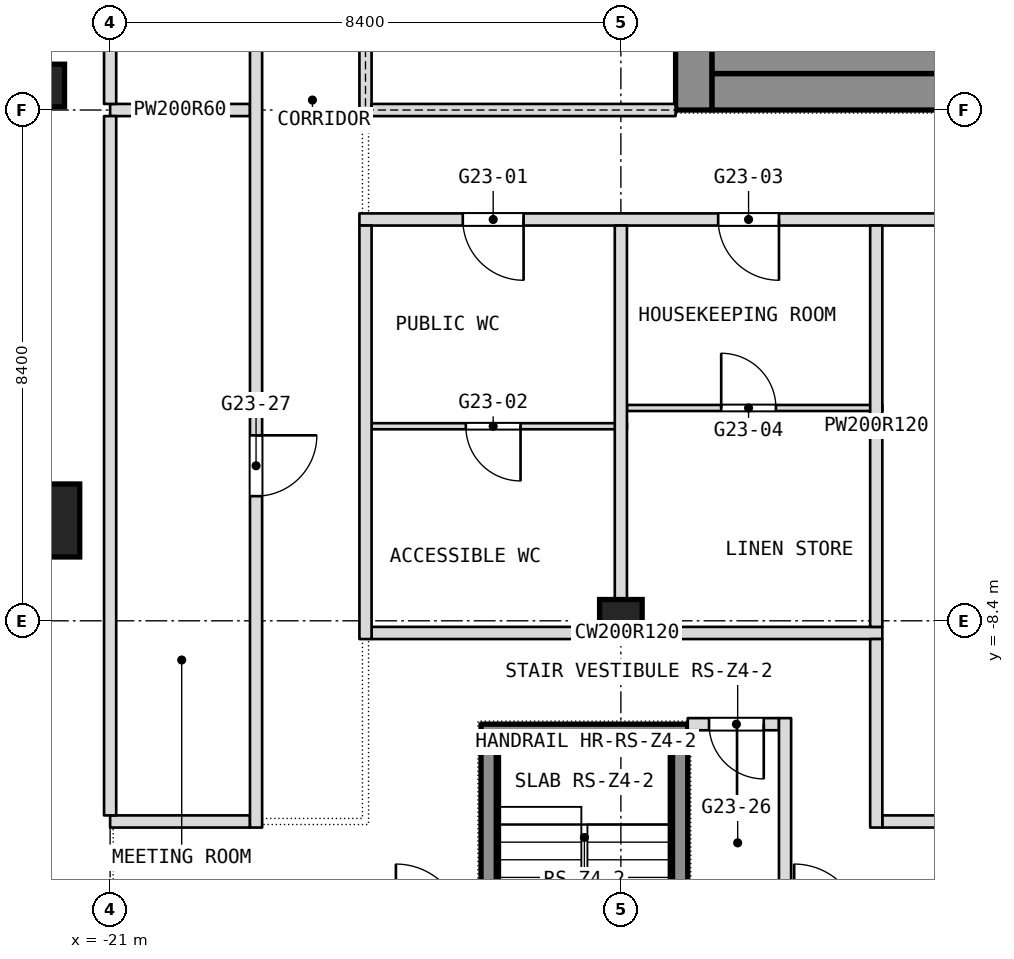
"""IFC4 building model, lengths in metres.
Left out: names, types, materials, properties, quantities, classifications, styles, units other than length and angle.
Written with IfcOpenShell. Run it as: python <this file> out.ifc"""

import sys

from ifc_helpers import new_model, si_unit, direction, frame, frame_2d, origin, origin_2d, place, context, subcontext, project, spatial, rectangle, extrude, element, fill, save


model = new_model("IFC4")
c1 = context("Model", 3, precision=1e-05, world=origin(), true_north=direction((0.0, 1.0)))
c2 = subcontext(c1, "Body", "Model", "MODEL_VIEW")
j1 = project(units=[si_unit("LENGTHUNIT", "METRE"), si_unit("PLANEANGLEUNIT", "RADIAN")], contexts=[c1])
p1 = place(None, origin())
s1 = spatial("IfcSite", under=j1, at=p1, CompositionType="ELEMENT")
p2 = place(p1, origin())
s2 = spatial("IfcBuilding", under=s1, at=p2, CompositionType="ELEMENT")
p3 = place(p2, frame((0.0, 0.0, 270.5)))
s3 = spatial("IfcBuildingStorey", under=s2, at=p3, CompositionType="ELEMENT", Elevation=270.5)
p4 = place(p3, frame((-11.4, 0.0, 0.0), z_axis=(0.0, 0.0, 1.0), x_axis=(0.0, 1.0, 0.0)))
e1 = element("IfcWall", 1, at=p4, inside=s3, PredefinedType="SHEAR", context=c2, shape_type="SweptSolid", body=[
    extrude(rectangle(XDim=16.8, YDim=0.6, at=frame_2d((8.4, 0.0))), origin(), (0.0, 0.0, 1.0), 3.6),
])
p5 = place(p4, frame((3.6, 0.0, 0.0)))
e2 = element("IfcOpeningElement", 2, at=p5, cuts=e1, PredefinedType="OPENING", context=c2, shape_type="SweptSolid", body=[
    extrude(rectangle(XDim=0.9, YDim=2.1, at=frame_2d((0.45, 1.05))), frame((0.0, 0.3, 0.0), z_axis=(0.0, -1.0, 0.0), x_axis=(1.0, 0.0, 0.0)), (0.0, 0.0, 1.0), 0.6),
])
p6 = place(p4, frame((6.825, 0.0, 0.0)))
e3 = element("IfcOpeningElement", 3, at=p6, cuts=e1, PredefinedType="OPENING", context=c2, shape_type="SweptSolid", body=[
    extrude(rectangle(XDim=1.2, YDim=2.1, at=frame_2d((0.6, 1.05))), frame((0.0, 0.3, 0.0), z_axis=(0.0, -1.0, 0.0), x_axis=(1.0, 0.0, 0.0)), (0.0, 0.0, 1.0), 0.6),
])
p7 = place(p4, frame((14.137, 0.0, 0.0)))
e4 = element("IfcOpeningElement", 4, at=p7, cuts=e1, PredefinedType="OPENING", context=c2, shape_type="SweptSolid", body=[
    extrude(rectangle(XDim=0.9, YDim=2.1, at=frame_2d((0.45, 1.05))), frame((0.0, 0.3, 0.0), z_axis=(0.0, -1.0, 0.0), x_axis=(1.0, 0.0, 0.0)), (0.0, 0.0, 1.0), 0.6),
])
p8 = place(p4, frame((11.512, 0.0, 0.0)))
e5 = element("IfcOpeningElement", 5, at=p8, cuts=e1, PredefinedType="OPENING", context=c2, shape_type="SweptSolid", body=[
    extrude(rectangle(XDim=0.9, YDim=2.1, at=frame_2d((0.45, 1.05))), frame((0.0, 0.3, 0.0), z_axis=(0.0, -1.0, 0.0), x_axis=(1.0, 0.0, 0.0)), (0.0, 0.0, 1.0), 0.6),
])
p9 = place(p4, frame((8.775, 0.0, 0.0)))
e6 = element("IfcOpeningElement", 6, at=p9, cuts=e1, PredefinedType="OPENING", context=c2, shape_type="SweptSolid", body=[
    extrude(rectangle(XDim=1.2, YDim=2.1, at=frame_2d((0.6, 1.05))), frame((0.0, 0.3, 0.0), z_axis=(0.0, -1.0, 0.0), x_axis=(1.0, 0.0, 0.0)), (0.0, 0.0, 1.0), 0.6),
])
p10 = place(p3, frame((-11.1, 0.3, 0.0), z_axis=(0.0, 0.0, 1.0), x_axis=(1.0, 0.0, 0.0)))
e7 = element("IfcWall", 7, at=p10, inside=s3, PredefinedType="SHEAR", context=c2, shape_type="SweptSolid", body=[
    extrude(rectangle(XDim=22.2, YDim=0.6, at=frame_2d((11.1, 0.0))), origin(), (0.0, 0.0, 1.0), 3.6),
])
p11 = place(p3, frame((-22.1, -6.75, 0.0), z_axis=(0.0, 0.0, 1.0), x_axis=(1.0, 0.0, 0.0)))
e8 = element("IfcColumn", 8, at=p11, inside=s3, PredefinedType="COLUMN", context=c2, shape_type="SweptSolid", body=[
    extrude(rectangle(XDim=1.2, YDim=1.2, at=origin_2d()), origin(), (0.0, 0.0, 1.0), 3.6),
])
for number, where, z_axis, x_axis in (
    (9, (-12.6, -8.4, 0.0), (0.0, 0.0, 1.0), (1.0, 0.0, 0.0)),
    (10, (-22.1, 0.403, 0.0), (0.0, 0.0, 1.0), (1.0, 0.0, 0.0)),
):
    element("IfcColumn", number, at=place(p3, frame(where, z_axis=z_axis, x_axis=x_axis)), inside=s3, PredefinedType="COLUMN", context=c2, shape_type="SweptSolid", body=[
        extrude(rectangle(XDim=0.7, YDim=0.7, at=origin_2d()), origin(), (0.0, 0.0, 1.0), 3.6),
    ])
p12 = place(p3, frame((-21.0, -11.7, 0.0), z_axis=(0.0, 0.0, 1.0), x_axis=(1.0, 0.0, 0.0)))
e11 = element("IfcWall", 11, at=p12, inside=s3, PredefinedType="PARTITIONING", context=c2, shape_type="SweptSolid", body=[
    extrude(rectangle(XDim=2.3, YDim=0.2, at=frame_2d((1.15, 0.0))), origin(), (0.0, 0.0, 1.0), 3.34),
])
p13 = place(p3, frame((-8.3, -11.7, 0.0), z_axis=(0.0, 0.0, 1.0), x_axis=(1.0, 0.0, 0.0)))
e12 = element("IfcWall", 12, at=p13, inside=s3, PredefinedType="PARTITIONING", context=c2, shape_type="SweptSolid", body=[
    extrude(rectangle(XDim=25.0, YDim=0.2, at=frame_2d((12.5, 0.0))), origin(), (0.0, 0.0, 1.0), 3.34),
])
p14 = place(p3, frame((-11.5, -10.1, 0.0), z_axis=(0.0, 0.0, 1.0), x_axis=(1.0, 0.0, 0.0)))
e13 = element("IfcWall", 13, at=p14, inside=s3, PredefinedType="PARTITIONING", context=c2, shape_type="SweptSolid", body=[
    extrude(rectangle(XDim=1.5, YDim=0.2, at=frame_2d((0.75, 0.0))), origin(), (0.0, 0.0, 1.0), 3.34),
])
p15 = place(p14, frame((0.35, 0.0, 0.0)))
e14 = element("IfcOpeningElement", 14, at=p15, cuts=e13, PredefinedType="OPENING", context=c2, shape_type="SweptSolid", body=[
    extrude(rectangle(XDim=0.9, YDim=2.1, at=frame_2d((0.45, 1.05))), frame((0.0, 0.1, 0.0), z_axis=(0.0, -1.0, 0.0), x_axis=(1.0, 0.0, 0.0)), (0.0, 0.0, 1.0), 0.2),
])
p16 = place(p3, frame((-16.7, -8.6, 0.0), z_axis=(0.0, 0.0, 1.0), x_axis=(1.0, 0.0, 0.0)))
e15 = element("IfcWall", 15, at=p16, inside=s3, PredefinedType="PARTITIONING", context=c2, shape_type="SweptSolid", body=[
    extrude(rectangle(XDim=8.4, YDim=0.2, at=frame_2d((4.2, 0.0))), origin(), (0.0, 0.0, 1.0), 3.34),
])
p17 = place(p3, frame((-16.7, -5.2, 0.0), z_axis=(0.0, 0.0, 1.0), x_axis=(1.0, 0.0, 0.0)))
e16 = element("IfcWall", 16, at=p17, inside=s3, PredefinedType="PARTITIONING", context=c2, shape_type="SweptSolid", body=[
    extrude(rectangle(XDim=4.2, YDim=0.1, at=frame_2d((2.1, 0.0))), origin(), (0.0, 0.0, 1.0), 3.34),
])
p18 = place(p17, frame((1.55, 0.0, 0.0)))
e17 = element("IfcOpeningElement", 17, at=p18, cuts=e16, PredefinedType="OPENING", context=c2, shape_type="SweptSolid", body=[
    extrude(rectangle(XDim=0.9, YDim=2.1, at=frame_2d((0.45, 1.05))), frame((0.0, 0.05, 0.0), z_axis=(0.0, -1.0, 0.0), x_axis=(1.0, 0.0, 0.0)), (0.0, 0.0, 1.0), 0.1),
])
p19 = place(p3, frame((-12.5, -4.9, 0.0), z_axis=(0.0, 0.0, 1.0), x_axis=(1.0, 0.0, 0.0)))
e18 = element("IfcWall", 18, at=p19, inside=s3, PredefinedType="PARTITIONING", context=c2, shape_type="SweptSolid", body=[
    extrude(rectangle(XDim=4.2, YDim=0.1, at=frame_2d((2.1, 0.0))), origin(), (0.0, 0.0, 1.0), 3.34),
])
p20 = place(p19, frame((1.55, 0.0, 0.0)))
e19 = element("IfcOpeningElement", 19, at=p20, cuts=e18, PredefinedType="OPENING", context=c2, shape_type="SweptSolid", body=[
    extrude(rectangle(XDim=0.9, YDim=2.1, at=frame_2d((0.45, 1.05))), frame((0.0, 0.05, 0.0), z_axis=(0.0, -1.0, 0.0), x_axis=(1.0, 0.0, 0.0)), (0.0, 0.0, 1.0), 0.1),
])
p21 = place(p3, frame((-16.9, -1.8, 0.0), z_axis=(0.0, 0.0, 1.0), x_axis=(1.0, 0.0, 0.0)))
e20 = element("IfcWall", 20, at=p21, inside=s3, PredefinedType="PARTITIONING", context=c2, shape_type="SweptSolid", body=[
    extrude(rectangle(XDim=33.8, YDim=0.2, at=frame_2d((16.9, 0.0))), origin(), (0.0, 0.0, 1.0), 3.34),
])
p22 = place(p21, frame((1.7, 0.0, 0.0)))
e21 = element("IfcOpeningElement", 21, at=p22, cuts=e20, PredefinedType="OPENING", context=c2, shape_type="SweptSolid", body=[
    extrude(rectangle(XDim=1.0, YDim=2.1, at=frame_2d((0.5, 1.05))), frame((0.0, 0.1, 0.0), z_axis=(0.0, -1.0, 0.0), x_axis=(1.0, 0.0, 0.0)), (0.0, 0.0, 1.0), 0.2),
])
p23 = place(p21, frame((5.9, 0.0, 0.0)))
e22 = element("IfcOpeningElement", 22, at=p23, cuts=e20, PredefinedType="OPENING", context=c2, shape_type="SweptSolid", body=[
    extrude(rectangle(XDim=1.0, YDim=2.1, at=frame_2d((0.5, 1.05))), frame((0.0, 0.1, 0.0), z_axis=(0.0, -1.0, 0.0), x_axis=(1.0, 0.0, 0.0)), (0.0, 0.0, 1.0), 0.2),
])
p24 = place(p21, frame((10.1, 0.0, 0.0)))
e23 = element("IfcOpeningElement", 23, at=p24, cuts=e20, PredefinedType="OPENING", context=c2, shape_type="SweptSolid", body=[
    extrude(rectangle(XDim=1.0, YDim=2.1, at=frame_2d((0.5, 1.05))), frame((0.0, 0.1, 0.0), z_axis=(0.0, -1.0, 0.0), x_axis=(1.0, 0.0, 0.0)), (0.0, 0.0, 1.0), 0.2),
])
p25 = place(p21, frame((16.0, 0.0, 0.0)))
e24 = element("IfcOpeningElement", 24, at=p25, cuts=e20, PredefinedType="OPENING", context=c2, shape_type="SweptSolid", body=[
    extrude(rectangle(XDim=1.8, YDim=2.1, at=frame_2d((0.9, 1.05))), frame((0.0, 0.1, 0.0), z_axis=(0.0, -1.0, 0.0), x_axis=(1.0, 0.0, 0.0)), (0.0, 0.0, 1.0), 0.2),
])
p26 = place(p21, frame((22.7, 0.0, 0.0)))
e25 = element("IfcOpeningElement", 25, at=p26, cuts=e20, PredefinedType="OPENING", context=c2, shape_type="SweptSolid", body=[
    extrude(rectangle(XDim=1.0, YDim=2.1, at=frame_2d((0.5, 1.05))), frame((0.0, 0.1, 0.0), z_axis=(0.0, -1.0, 0.0), x_axis=(1.0, 0.0, 0.0)), (0.0, 0.0, 1.0), 0.2),
])
p27 = place(p21, frame((26.9, 0.0, 0.0)))
e26 = element("IfcOpeningElement", 26, at=p27, cuts=e20, PredefinedType="OPENING", context=c2, shape_type="SweptSolid", body=[
    extrude(rectangle(XDim=1.0, YDim=2.1, at=frame_2d((0.5, 1.05))), frame((0.0, 0.1, 0.0), z_axis=(0.0, -1.0, 0.0), x_axis=(1.0, 0.0, 0.0)), (0.0, 0.0, 1.0), 0.2),
])
p28 = place(p21, frame((31.1, 0.0, 0.0)))
e27 = element("IfcOpeningElement", 27, at=p28, cuts=e20, PredefinedType="OPENING", context=c2, shape_type="SweptSolid", body=[
    extrude(rectangle(XDim=1.0, YDim=2.1, at=frame_2d((0.5, 1.05))), frame((0.0, 0.1, 0.0), z_axis=(0.0, -1.0, 0.0), x_axis=(1.0, 0.0, 0.0)), (0.0, 0.0, 1.0), 0.2),
])
p29 = place(p3, frame((-21.0, 0.0, 0.0), z_axis=(0.0, 0.0, 1.0), x_axis=(1.0, 0.0, 0.0)))
e28 = element("IfcWall", 28, at=p29, inside=s3, PredefinedType="PARTITIONING", context=c2, shape_type="SweptSolid", body=[
    extrude(rectangle(XDim=2.3, YDim=0.2, at=frame_2d((1.15, 0.0))), origin(), (0.0, 0.0, 1.0), 3.0),
])
p30 = place(p3, frame((-8.4, -11.8, 0.0), z_axis=(0.0, 0.0, 1.0), x_axis=(0.0, 1.0, 0.0)))
e29 = element("IfcWall", 29, at=p30, inside=s3, PredefinedType="PARTITIONING", context=c2, shape_type="SweptSolid", body=[
    extrude(rectangle(XDim=3.1, YDim=0.2, at=frame_2d((1.55, 0.0))), origin(), (0.0, 0.0, 1.0), 3.34),
])
p31 = place(p3, frame((-8.4, -8.5, 0.0), z_axis=(0.0, 0.0, 1.0), x_axis=(0.0, 1.0, 0.0)))
e30 = element("IfcWall", 30, at=p31, inside=s3, PredefinedType="PARTITIONING", context=c2, shape_type="SweptSolid", body=[
    extrude(rectangle(XDim=6.6, YDim=0.2, at=frame_2d((3.3, 0.0))), origin(), (0.0, 0.0, 1.0), 3.34),
])
p32 = place(p3, frame((-9.9, -13.4, 0.0), z_axis=(0.0, 0.0, 1.0), x_axis=(0.0, 1.0, 0.0)))
e31 = element("IfcWall", 31, at=p32, inside=s3, PredefinedType="PARTITIONING", context=c2, shape_type="SweptSolid", body=[
    extrude(rectangle(XDim=3.4, YDim=0.2, at=frame_2d((1.7, 0.0))), origin(), (0.0, 0.0, 1.0), 3.34),
])
p33 = place(p3, frame((-12.6, -8.5, 0.0), z_axis=(0.0, 0.0, 1.0), x_axis=(0.0, 1.0, 0.0)))
e32 = element("IfcWall", 32, at=p33, inside=s3, PredefinedType="PARTITIONING", context=c2, shape_type="SweptSolid", body=[
    extrude(rectangle(XDim=6.6, YDim=0.2, at=frame_2d((3.3, 0.0))), origin(), (0.0, 0.0, 1.0), 3.34),
])
p34 = place(p3, frame((-16.8, -8.7, 0.0), z_axis=(0.0, 0.0, 1.0), x_axis=(0.0, 1.0, 0.0)))
e33 = element("IfcWall", 33, at=p34, inside=s3, PredefinedType="PARTITIONING", context=c2, shape_type="SweptSolid", body=[
    extrude(rectangle(XDim=6.8, YDim=0.2, at=frame_2d((3.4, 0.0))), origin(), (0.0, 0.0, 1.0), 3.34),
])
p35 = place(p3, frame((-18.6, -11.8, 0.0), z_axis=(0.0, 0.0, 1.0), x_axis=(0.0, 1.0, 0.0)))
e34 = element("IfcWall", 34, at=p35, inside=s3, PredefinedType="PARTITIONING", context=c2, shape_type="SweptSolid", body=[
    extrude(rectangle(XDim=27.336, YDim=0.2, at=frame_2d((13.668, 0.0))), origin(), (0.0, 0.0, 1.0), 3.34),
])
p36 = place(p35, frame((18.668, 0.0, 0.0)))
e35 = element("IfcOpeningElement", 35, at=p36, cuts=e34, PredefinedType="OPENING", context=c2, shape_type="SweptSolid", body=[
    extrude(rectangle(XDim=1.8, YDim=2.1, at=frame_2d((0.9, 1.05))), frame((0.0, 0.1, 0.0), z_axis=(0.0, -1.0, 0.0), x_axis=(1.0, 0.0, 0.0)), (0.0, 0.0, 1.0), 0.2),
])
p37 = place(p35, frame((5.45, 0.0, 0.0)))
e36 = element("IfcOpeningElement", 36, at=p37, cuts=e34, PredefinedType="OPENING", context=c2, shape_type="SweptSolid", body=[
    extrude(rectangle(XDim=1.0, YDim=2.1, at=frame_2d((0.5, 1.05))), frame((0.0, 0.1, 0.0), z_axis=(0.0, -1.0, 0.0), x_axis=(1.0, 0.0, 0.0)), (0.0, 0.0, 1.0), 0.2),
])
p38 = place(p3, frame((-21.0, -11.6, 0.0), z_axis=(0.0, 0.0, 1.0), x_axis=(0.0, 1.0, 0.0)))
e37 = element("IfcWall", 37, at=p38, inside=s3, PredefinedType="PARTITIONING", context=c2, shape_type="SweptSolid", body=[
    extrude(rectangle(XDim=11.5, YDim=0.2, at=frame_2d((5.75, 0.0))), origin(), (0.0, 0.0, 1.0), 3.34),
])
p39 = place(p3, frame((-21.0, 0.1, 0.0), z_axis=(0.0, 0.0, 1.0), x_axis=(0.0, 1.0, 0.0)))
e38 = element("IfcWall", 38, at=p39, inside=s3, PredefinedType="PARTITIONING", context=c2, shape_type="SweptSolid", body=[
    extrude(rectangle(XDim=10.602, YDim=0.2, at=frame_2d((5.301, 0.0))), origin(), (0.0, 0.0, 1.0), 3.34),
])
p40 = place(p3, frame((-11.1, 1.05, 0.0), z_axis=(0.0, 0.0, 1.0), x_axis=(1.0, 0.0, 0.0)))
e39 = element("IfcWall", 39, at=p40, inside=s3, PredefinedType="PARTITIONING", context=c2, shape_type="SweptSolid", body=[
    extrude(rectangle(XDim=22.2, YDim=0.9, at=frame_2d((11.1, 0.0))), origin(), (0.0, 0.0, 1.0), 3.34),
])
p41 = place(p3, frame((-16.8, -0.1, 0.0), z_axis=(0.0, 0.0, 1.0), x_axis=(0.0, 1.0, 0.0)))
e40 = element("IfcWall", 40, at=p41, inside=s3, PredefinedType="PARTITIONING", context=c2, shape_type="SweptSolid", body=[
    extrude(rectangle(XDim=17.0, YDim=0.2, at=frame_2d((8.5, 0.0))), origin(), (0.0, 0.0, 1.0), 3.34),
])
p42 = place(p41, frame((2.2, 0.0, 0.0)))
e41 = element("IfcOpeningElement", 41, at=p42, cuts=e40, PredefinedType="OPENING", context=c2, shape_type="SweptSolid", body=[
    extrude(rectangle(XDim=1.8, YDim=2.1, at=frame_2d((0.9, 1.05))), frame((0.0, 0.1, 0.0), z_axis=(0.0, -1.0, 0.0), x_axis=(1.0, 0.0, 0.0)), (0.0, 0.0, 1.0), 0.2),
])
p43 = place(p41, frame((13.0, 0.0, 0.0)))
e42 = element("IfcOpeningElement", 42, at=p43, cuts=e40, PredefinedType="OPENING", context=c2, shape_type="SweptSolid", body=[
    extrude(rectangle(XDim=1.8, YDim=2.1, at=frame_2d((0.9, 1.05))), frame((0.0, 0.1, 0.0), z_axis=(0.0, -1.0, 0.0), x_axis=(1.0, 0.0, 0.0)), (0.0, 0.0, 1.0), 0.2),
])
p44 = place(p3, frame((-16.7, 0.0, 0.0), z_axis=(0.0, 0.0, 1.0), x_axis=(1.0, 0.0, 0.0)))
e43 = element("IfcWall", 43, at=p44, inside=s3, PredefinedType="PARTITIONING", context=c2, shape_type="SweptSolid", body=[
    extrude(rectangle(XDim=5.0, YDim=0.2, at=frame_2d((2.5, 0.0))), origin(), (0.0, 0.0, 1.0), 3.0),
])
p45 = place(p3, frame((-14.9, -10.225, 0.1), z_axis=(0.0, 0.0, 1.0), x_axis=(1.0, 0.0, 0.0)))
e44 = element("IfcWall", 44, at=p45, inside=s3, PredefinedType="SHEAR", context=c2, shape_type="SweptSolid", body=[
    extrude(rectangle(XDim=3.4, YDim=0.25, at=frame_2d((1.7, 0.0))), origin(), (0.0, 0.0, 1.0), 3.6),
])
p46 = place(p3, frame((-14.775, -16.05, 0.1), z_axis=(0.0, 0.0, 1.0), x_axis=(0.0, 1.0, 0.0)))
e45 = element("IfcWall", 45, at=p46, inside=s3, PredefinedType="SHEAR", context=c2, shape_type="SweptSolid", body=[
    extrude(rectangle(XDim=5.7, YDim=0.25, at=frame_2d((2.85, 0.0))), origin(), (0.0, 0.0, 1.0), 3.6),
])
p47 = place(p3, frame((-11.625, -16.05, 0.1), z_axis=(0.0, 0.0, 1.0), x_axis=(0.0, 1.0, 0.0)))
e46 = element("IfcWall", 46, at=p47, inside=s3, PredefinedType="SHEAR", context=c2, shape_type="SweptSolid", body=[
    extrude(rectangle(XDim=5.7, YDim=0.25, at=frame_2d((2.85, 0.0))), origin(), (0.0, 0.0, 1.0), 3.6),
])
p48 = place(p47, frame((0.2, 0.0, 0.0)))
e47 = element("IfcOpeningElement", 47, at=p48, cuts=e46, PredefinedType="OPENING", context=c2, shape_type="SweptSolid", body=[
    extrude(rectangle(XDim=1.0, YDim=2.1, at=frame_2d((0.5, 1.05))), frame((0.0, 0.125, 0.0), z_axis=(0.0, -1.0, 0.0), x_axis=(1.0, 0.0, 0.0)), (0.0, 0.0, 1.0), 0.25),
])
p49 = place(p15, origin())
e48 = element("IfcDoor", 48, at=p49, inside=s3, OperationType="SINGLE_SWING_LEFT", PredefinedType="DOOR", context=c2, shape_type="SweptSolid", body=[
    extrude(rectangle(XDim=0.9, YDim=2.1, at=frame_2d((0.45, 1.05))), frame((0.0, 0.025, 0.0), z_axis=(0.0, -1.0, 0.0), x_axis=(1.0, 0.0, 0.0)), (0.0, 0.0, 1.0), 0.05),
])
fill(e14, e48)
p50 = place(p18, origin())
e49 = element("IfcDoor", 49, at=p50, inside=s3, OperationType="SINGLE_SWING_RIGHT", PredefinedType="DOOR", context=c2, shape_type="SweptSolid", body=[
    extrude(rectangle(XDim=0.9, YDim=2.1, at=frame_2d((0.45, 1.05))), frame((0.0, 0.025, 0.0), z_axis=(0.0, -1.0, 0.0), x_axis=(1.0, 0.0, 0.0)), (0.0, 0.0, 1.0), 0.05),
])
fill(e17, e49)
p51 = place(p20, origin())
e50 = element("IfcDoor", 50, at=p51, inside=s3, OperationType="SINGLE_SWING_RIGHT", PredefinedType="DOOR", context=c2, shape_type="SweptSolid", body=[
    extrude(rectangle(XDim=0.9, YDim=2.1, at=frame_2d((0.45, 1.05))), frame((0.0, 0.025, 0.0), z_axis=(0.0, -1.0, 0.0), x_axis=(1.0, 0.0, 0.0)), (0.0, 0.0, 1.0), 0.05),
])
fill(e19, e50)
p52 = place(p22, origin())
e51 = element("IfcDoor", 51, at=p52, inside=s3, OperationType="SINGLE_SWING_LEFT", PredefinedType="DOOR", context=c2, shape_type="SweptSolid", body=[
    extrude(rectangle(XDim=1.0, YDim=2.1, at=frame_2d((0.5, 1.05))), frame((0.0, 0.025, 0.0), z_axis=(0.0, -1.0, 0.0), x_axis=(1.0, 0.0, 0.0)), (0.0, 0.0, 1.0), 0.05),
])
fill(e21, e51)
p53 = place(p23, origin())
e52 = element("IfcDoor", 52, at=p53, inside=s3, OperationType="SINGLE_SWING_LEFT", PredefinedType="DOOR", context=c2, shape_type="SweptSolid", body=[
    extrude(rectangle(XDim=1.0, YDim=2.1, at=frame_2d((0.5, 1.05))), frame((0.0, 0.025, 0.0), z_axis=(0.0, -1.0, 0.0), x_axis=(1.0, 0.0, 0.0)), (0.0, 0.0, 1.0), 0.05),
])
fill(e22, e52)
p54 = place(p37, origin())
e53 = element("IfcDoor", 53, at=p54, inside=s3, OperationType="SINGLE_SWING_LEFT", PredefinedType="DOOR", context=c2, shape_type="SweptSolid", body=[
    extrude(rectangle(XDim=1.0, YDim=2.1, at=frame_2d((0.5, 1.05))), frame((0.0, 0.025, 0.0), z_axis=(0.0, -1.0, 0.0), x_axis=(1.0, 0.0, 0.0)), (0.0, 0.0, 1.0), 0.05),
])
fill(e36, e53)
save(model, sys.argv[1])
